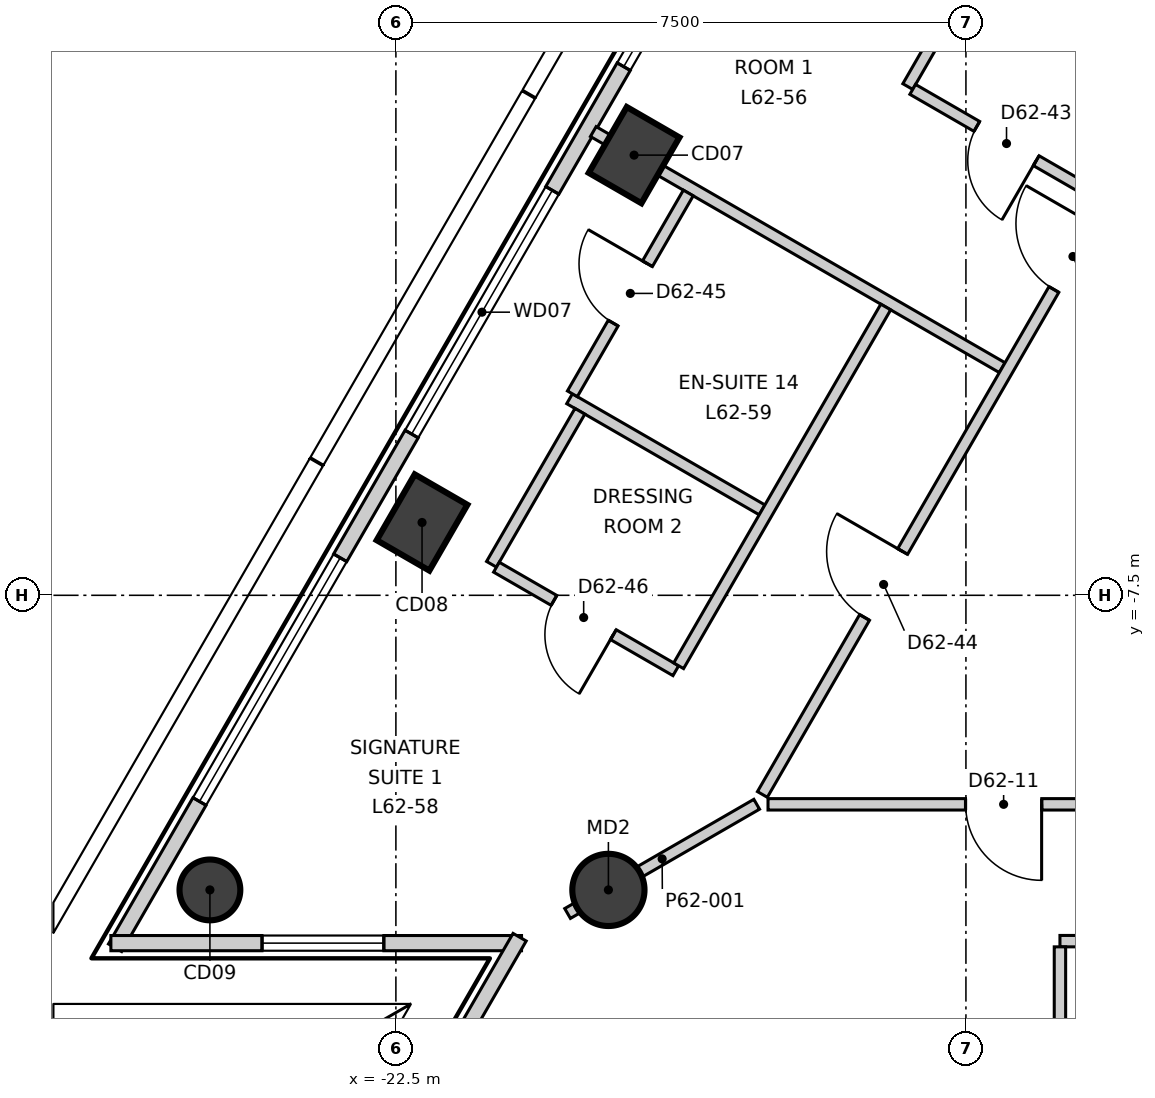
"""IFC4 building model, lengths in metres.
Left out: names, types, materials, properties, quantities, classifications, styles, units other than length and angle.
Written with IfcOpenShell. Run it as: python <this file> out.ifc"""

import sys

from ifc_helpers import new_model, si_unit, direction, frame, frame_2d, origin, origin_2d, place, context, subcontext, project, spatial, rectangle, circle, extrude, element, fill, save


model = new_model("IFC4")
c1 = context("Model", 3, precision=1e-05, world=origin(), true_north=direction((0.0, 1.0)))
c2 = subcontext(c1, "Body", "Model", "MODEL_VIEW")
j1 = project(units=[si_unit("LENGTHUNIT", "METRE"), si_unit("PLANEANGLEUNIT", "RADIAN")], contexts=[c1])
p1 = place(None, origin())
s1 = spatial("IfcSite", under=j1, at=p1, CompositionType="ELEMENT")
p2 = place(p1, origin())
s2 = spatial("IfcBuilding", under=s1, at=p2, CompositionType="ELEMENT")
p3 = place(p2, frame((0.0, 0.0, 268.3)))
s3 = spatial("IfcBuildingStorey", under=s2, at=p3, CompositionType="ELEMENT", Elevation=268.3)
for number, where, z_axis, x_axis in (
    (1, (-19.366, -1.709, -0.3), (0.0, 0.0, 1.0), (0.5, 0.866, 0.0)),
    (2, (-22.156, -6.542, -0.3), (0.0, 0.0, 1.0), (0.5, 0.866, 0.0)),
):
    element("IfcColumn", number, at=place(p3, frame(where, z_axis=z_axis, x_axis=x_axis)), inside=s3, PredefinedType="COLUMN", context=c2, shape_type="SweptSolid", body=[
        extrude(rectangle(XDim=1.0, YDim=0.8, at=origin_2d()), origin(), (0.0, 0.0, 1.0), 3.6),
    ])
p4 = place(p3, frame((-24.947, -11.376, -0.3), z_axis=(0.0, 0.0, 1.0), x_axis=(0.5, 0.866025403784, 0.0)))
e3 = element("IfcColumn", 3, at=p4, inside=s3, PredefinedType="COLUMN", context=c2, shape_type="SweptSolid", body=[
    extrude(circle(Radius=0.4, at=origin_2d()), origin(), (0.0, 0.0, 1.0), 3.6),
])
p5 = place(p3, frame((-19.704, -11.376, -0.3), z_axis=(0.0, 0.0, 1.0), x_axis=(1.0, 0.0, 0.0)))
e4 = element("IfcColumn", 4, at=p5, inside=s3, PredefinedType="COLUMN", context=c2, shape_type="SweptSolid", body=[
    extrude(circle(Radius=0.475, at=origin_2d()), origin(), (0.0, 0.0, 1.0), 3.6),
])
p6 = place(p3, frame((-2.577, 28.771, 0.0), z_axis=(0.0, 0.0, 1.0), x_axis=(-0.49999909388, -0.866025926932, 0.0)))
e5 = element("IfcWall", 5, at=p6, inside=s3, PredefinedType="ELEMENTEDWALL", context=c2, shape_type="SweptSolid", body=[
    extrude(rectangle(XDim=47.236, YDim=0.2, at=frame_2d((23.618, 0.0))), origin(), (0.0, 0.0, 1.0), 3.3),
])
p7 = place(p6, frame((2.243, 0.0, 0.9)))
e6 = element("IfcOpeningElement", 6, at=p7, cuts=e5, PredefinedType="OPENING", context=c2, shape_type="SweptSolid", body=[
    extrude(rectangle(XDim=3.7, YDim=2.2, at=frame_2d((1.85, 1.1))), frame((0.0, 0.11, 0.0), z_axis=(0.0, -1.0, 0.0), x_axis=(1.0, 0.0, 0.0)), (0.0, 0.0, 1.0), 0.22),
])
p8 = place(p6, frame((7.824, 0.0, 0.9)))
e7 = element("IfcOpeningElement", 7, at=p8, cuts=e5, PredefinedType="OPENING", context=c2, shape_type="SweptSolid", body=[
    extrude(rectangle(XDim=3.7, YDim=2.2, at=frame_2d((1.85, 1.1))), frame((0.0, 0.11, 0.0), z_axis=(0.0, -1.0, 0.0), x_axis=(1.0, 0.0, 0.0)), (0.0, 0.0, 1.0), 0.22),
])
p9 = place(p6, frame((13.406, 0.0, 0.9)))
e8 = element("IfcOpeningElement", 8, at=p9, cuts=e5, PredefinedType="OPENING", context=c2, shape_type="SweptSolid", body=[
    extrude(rectangle(XDim=3.7, YDim=2.2, at=frame_2d((1.85, 1.1))), frame((0.0, 0.11, 0.0), z_axis=(0.0, -1.0, 0.0), x_axis=(1.0, 0.0, 0.0)), (0.0, 0.0, 1.0), 0.22),
])
p10 = place(p6, frame((18.987, 0.0, 0.9)))
e9 = element("IfcOpeningElement", 9, at=p10, cuts=e5, PredefinedType="OPENING", context=c2, shape_type="SweptSolid", body=[
    extrude(rectangle(XDim=3.7, YDim=2.2, at=frame_2d((1.85, 1.1))), frame((0.0, 0.11, 0.0), z_axis=(0.0, -1.0, 0.0), x_axis=(1.0, 0.0, 0.0)), (0.0, 0.0, 1.0), 0.22),
])
p11 = place(p6, frame((24.569, 0.0, 0.9)))
e10 = element("IfcOpeningElement", 10, at=p11, cuts=e5, PredefinedType="OPENING", context=c2, shape_type="SweptSolid", body=[
    extrude(rectangle(XDim=3.7, YDim=2.2, at=frame_2d((1.85, 1.1))), frame((0.0, 0.11, 0.0), z_axis=(0.0, -1.0, 0.0), x_axis=(1.0, 0.0, 0.0)), (0.0, 0.0, 1.0), 0.22),
])
p12 = place(p6, frame((30.15, 0.0, 0.9)))
e11 = element("IfcOpeningElement", 11, at=p12, cuts=e5, PredefinedType="OPENING", context=c2, shape_type="SweptSolid", body=[
    extrude(rectangle(XDim=3.7, YDim=2.2, at=frame_2d((1.85, 1.1))), frame((0.0, 0.11, 0.0), z_axis=(0.0, -1.0, 0.0), x_axis=(1.0, 0.0, 0.0)), (0.0, 0.0, 1.0), 0.22),
])
p13 = place(p6, frame((35.731, 0.0, 0.9)))
e12 = element("IfcOpeningElement", 12, at=p13, cuts=e5, PredefinedType="OPENING", context=c2, shape_type="SweptSolid", body=[
    extrude(rectangle(XDim=3.7, YDim=2.2, at=frame_2d((1.85, 1.1))), frame((0.0, 0.11, 0.0), z_axis=(0.0, -1.0, 0.0), x_axis=(1.0, 0.0, 0.0)), (0.0, 0.0, 1.0), 0.22),
])
p14 = place(p6, frame((41.313, 0.0, 0.9)))
e13 = element("IfcOpeningElement", 13, at=p14, cuts=e5, PredefinedType="OPENING", context=c2, shape_type="SweptSolid", body=[
    extrude(rectangle(XDim=3.7, YDim=2.2, at=frame_2d((1.85, 1.1))), frame((0.0, 0.11, 0.0), z_axis=(0.0, -1.0, 0.0), x_axis=(1.0, 0.0, 0.0)), (0.0, 0.0, 1.0), 0.22),
])
p15 = place(p3, frame((-26.25, -12.076, 0.0), z_axis=(0.0, 0.0, 1.0), x_axis=(1.0, 0.0, 0.0)))
e14 = element("IfcWall", 14, at=p15, inside=s3, PredefinedType="ELEMENTEDWALL", context=c2, shape_type="SweptSolid", body=[
    extrude(rectangle(XDim=5.403, YDim=0.2, at=frame_2d((2.702, 0.0))), origin(), (0.0, 0.0, 1.0), 3.3),
])
p16 = place(p15, frame((1.99, 0.0, 0.9)))
e15 = element("IfcOpeningElement", 15, at=p16, cuts=e14, PredefinedType="OPENING", context=c2, shape_type="SweptSolid", body=[
    extrude(rectangle(XDim=1.6, YDim=2.2, at=frame_2d((0.8, 1.1))), frame((0.0, 0.11, 0.0), z_axis=(0.0, -1.0, 0.0), x_axis=(1.0, 0.0, 0.0)), (0.0, 0.0, 1.0), 0.22),
])
p17 = place(p3, frame((-20.872, -11.998, 0.0), z_axis=(0.0, 0.0, 1.0), x_axis=(-0.499992297805, -0.866029850603, 0.0)))
e16 = element("IfcWall", 16, at=p17, inside=s3, PredefinedType="ELEMENTEDWALL", context=c2, shape_type="SweptSolid", body=[
    extrude(rectangle(XDim=5.404, YDim=0.2, at=frame_2d((2.702, 0.0))), origin(), (0.0, 0.0, 1.0), 3.3),
])
p18 = place(p17, frame((1.39, 0.0, 0.9)))
e17 = element("IfcOpeningElement", 17, at=p18, cuts=e16, PredefinedType="OPENING", context=c2, shape_type="SweptSolid", body=[
    extrude(rectangle(XDim=1.6, YDim=2.2, at=frame_2d((0.8, 1.1))), frame((0.0, 0.11, 0.0), z_axis=(0.0, -1.0, 0.0), x_axis=(1.0, 0.0, 0.0)), (0.0, 0.0, 1.0), 0.22),
])
p19 = place(p3, frame((-20.241, -11.686, 0.0), z_axis=(0.0, 0.0, 1.0), x_axis=(0.86594358484, 0.5001416878, 0.0)))
e18 = element("IfcWall", 18, at=p19, inside=s3, PredefinedType="PARTITIONING", context=c2, shape_type="SweptSolid", body=[
    extrude(rectangle(XDim=2.873, YDim=0.15, at=frame_2d((1.437, 0.0))), origin(), (0.0, 0.0, 1.0), 2.8),
])
p20 = place(p3, frame((-19.903, -1.399, 0.0), z_axis=(0.0, 0.0, 1.0), x_axis=(0.866043575568, -0.499968524226, 0.0)))
e19 = element("IfcWall", 19, at=p20, inside=s3, PredefinedType="PARTITIONING", context=c2, shape_type="SweptSolid", body=[
    extrude(rectangle(XDim=6.212, YDim=0.15, at=frame_2d((3.106, 0.0))), origin(), (0.0, 0.0, 1.0), 3.3),
])
p21 = place(p3, frame((-17.678, -10.12, 0.0), z_axis=(0.0, 0.0, 1.0), x_axis=(0.49998824015, 0.86603219323, 0.0)))
e20 = element("IfcWall", 20, at=p21, inside=s3, PredefinedType="PARTITIONING", context=c2, shape_type="SweptSolid", body=[
    extrude(rectangle(XDim=35.357, YDim=0.15, at=frame_2d((17.678, 0.0))), origin(), (0.0, 0.0, 1.0), 3.3),
])
p22 = place(p21, frame((31.607, 0.0, 0.0)))
e21 = element("IfcOpeningElement", 21, at=p22, cuts=e20, PredefinedType="OPENING", context=c2, shape_type="SweptSolid", body=[
    extrude(rectangle(XDim=1.0, YDim=2.1, at=frame_2d((0.5, 1.05))), frame((0.0, 0.085, 0.0), z_axis=(0.0, -1.0, 0.0), x_axis=(1.0, 0.0, 0.0)), (0.0, 0.0, 1.0), 0.17),
])
p23 = place(p21, frame((19.416, 0.0, 0.0)))
e22 = element("IfcOpeningElement", 22, at=p23, cuts=e20, PredefinedType="OPENING", context=c2, shape_type="SweptSolid", body=[
    extrude(rectangle(XDim=1.0, YDim=2.1, at=frame_2d((0.5, 1.05))), frame((0.0, 0.085, 0.0), z_axis=(0.0, -1.0, 0.0), x_axis=(1.0, 0.0, 0.0)), (0.0, 0.0, 1.0), 0.17),
])
p24 = place(p21, frame((24.916, 0.0, 0.0)))
e23 = element("IfcOpeningElement", 23, at=p24, cuts=e20, PredefinedType="OPENING", context=c2, shape_type="SweptSolid", body=[
    extrude(rectangle(XDim=0.9, YDim=2.1, at=frame_2d((0.45, 1.05))), frame((0.0, 0.085, 0.0), z_axis=(0.0, -1.0, 0.0), x_axis=(1.0, 0.0, 0.0)), (0.0, 0.0, 1.0), 0.17),
])
p25 = place(p21, frame((22.816, 0.0, 0.0)))
e24 = element("IfcOpeningElement", 24, at=p25, cuts=e20, PredefinedType="OPENING", context=c2, shape_type="SweptSolid", body=[
    extrude(rectangle(XDim=0.9, YDim=2.1, at=frame_2d((0.45, 1.05))), frame((0.0, 0.085, 0.0), z_axis=(0.0, -1.0, 0.0), x_axis=(1.0, 0.0, 0.0)), (0.0, 0.0, 1.0), 0.17),
])
p26 = place(p21, frame((14.654, 0.0, 0.0)))
e25 = element("IfcOpeningElement", 25, at=p26, cuts=e20, PredefinedType="OPENING", context=c2, shape_type="SweptSolid", body=[
    extrude(rectangle(XDim=1.0, YDim=2.1, at=frame_2d((0.5, 1.05))), frame((0.0, 0.085, 0.0), z_axis=(0.0, -1.0, 0.0), x_axis=(1.0, 0.0, 0.0)), (0.0, 0.0, 1.0), 0.17),
])
p27 = place(p21, frame((7.672, 0.0, 0.0)))
e26 = element("IfcOpeningElement", 26, at=p27, cuts=e20, PredefinedType="OPENING", context=c2, shape_type="SweptSolid", body=[
    extrude(rectangle(XDim=1.0, YDim=2.1, at=frame_2d((0.5, 1.05))), frame((0.0, 0.085, 0.0), z_axis=(0.0, -1.0, 0.0), x_axis=(1.0, 0.0, 0.0)), (0.0, 0.0, 1.0), 0.17),
])
p28 = place(p21, frame((2.69, 0.0, 0.0)))
e27 = element("IfcOpeningElement", 27, at=p28, cuts=e20, PredefinedType="OPENING", context=c2, shape_type="SweptSolid", body=[
    extrude(rectangle(XDim=1.0, YDim=2.1, at=frame_2d((0.5, 1.05))), frame((0.0, 0.085, 0.0), z_axis=(0.0, -1.0, 0.0), x_axis=(1.0, 0.0, 0.0)), (0.0, 0.0, 1.0), 0.17),
])
p29 = place(p3, frame((-17.604, -10.25, 0.0), z_axis=(0.0, 0.0, 1.0), x_axis=(1.0, 0.0, 0.0)))
e28 = element("IfcWall", 28, at=p29, inside=s3, PredefinedType="PARTITIONING", context=c2, shape_type="SweptSolid", body=[
    extrude(rectangle(XDim=35.358, YDim=0.15, at=frame_2d((17.679, 0.0))), origin(), (0.0, 0.0, 1.0), 3.3),
])
p30 = place(p29, frame((2.6, 0.0, 0.0)))
e29 = element("IfcOpeningElement", 29, at=p30, cuts=e28, PredefinedType="OPENING", context=c2, shape_type="SweptSolid", body=[
    extrude(rectangle(XDim=1.0, YDim=2.1, at=frame_2d((0.5, 1.05))), frame((0.0, 0.085, 0.0), z_axis=(0.0, -1.0, 0.0), x_axis=(1.0, 0.0, 0.0)), (0.0, 0.0, 1.0), 0.17),
])
p31 = place(p29, frame((8.391, 0.0, 0.0)))
e30 = element("IfcOpeningElement", 30, at=p31, cuts=e28, PredefinedType="OPENING", context=c2, shape_type="SweptSolid", body=[
    extrude(rectangle(XDim=1.0, YDim=2.1, at=frame_2d((0.5, 1.05))), frame((0.0, 0.085, 0.0), z_axis=(0.0, -1.0, 0.0), x_axis=(1.0, 0.0, 0.0)), (0.0, 0.0, 1.0), 0.17),
])
p32 = place(p29, frame((20.473, 0.0, 0.0)))
e31 = element("IfcOpeningElement", 31, at=p32, cuts=e28, PredefinedType="OPENING", context=c2, shape_type="SweptSolid", body=[
    extrude(rectangle(XDim=1.0, YDim=2.1, at=frame_2d((0.5, 1.05))), frame((0.0, 0.085, 0.0), z_axis=(0.0, -1.0, 0.0), x_axis=(1.0, 0.0, 0.0)), (0.0, 0.0, 1.0), 0.17),
])
p33 = place(p29, frame((14.973, 0.0, 0.0)))
e32 = element("IfcOpeningElement", 32, at=p33, cuts=e28, PredefinedType="OPENING", context=c2, shape_type="SweptSolid", body=[
    extrude(rectangle(XDim=0.9, YDim=2.1, at=frame_2d((0.45, 1.05))), frame((0.0, 0.085, 0.0), z_axis=(0.0, -1.0, 0.0), x_axis=(1.0, 0.0, 0.0)), (0.0, 0.0, 1.0), 0.17),
])
p34 = place(p29, frame((17.173, 0.0, 0.0)))
e33 = element("IfcOpeningElement", 33, at=p34, cuts=e28, PredefinedType="OPENING", context=c2, shape_type="SweptSolid", body=[
    extrude(rectangle(XDim=0.9, YDim=2.1, at=frame_2d((0.45, 1.05))), frame((0.0, 0.085, 0.0), z_axis=(0.0, -1.0, 0.0), x_axis=(1.0, 0.0, 0.0)), (0.0, 0.0, 1.0), 0.17),
])
p35 = place(p29, frame((28.735, 0.0, 0.0)))
e34 = element("IfcOpeningElement", 34, at=p35, cuts=e28, PredefinedType="OPENING", context=c2, shape_type="SweptSolid", body=[
    extrude(rectangle(XDim=1.0, YDim=2.1, at=frame_2d((0.5, 1.05))), frame((0.0, 0.085, 0.0), z_axis=(0.0, -1.0, 0.0), x_axis=(1.0, 0.0, 0.0)), (0.0, 0.0, 1.0), 0.17),
])
p36 = place(p3, frame((-20.215, -4.914, 0.0), z_axis=(0.0, 0.0, 1.0), x_axis=(0.866118873815, -0.499838070201, 0.0)))
e35 = element("IfcWall", 35, at=p36, inside=s3, PredefinedType="PARTITIONING", context=c2, shape_type="SweptSolid", body=[
    extrude(rectangle(XDim=2.925, YDim=0.15, at=frame_2d((1.462, 0.0))), origin(), (0.0, 0.0, 1.0), 3.3),
])
p37 = place(p3, frame((-21.242, -7.092, 0.0), z_axis=(0.0, 0.0, 1.0), x_axis=(0.500216356891, 0.865900454035, 0.0)))
e36 = element("IfcWall", 36, at=p37, inside=s3, PredefinedType="PARTITIONING", context=c2, shape_type="SweptSolid", body=[
    extrude(rectangle(XDim=2.325, YDim=0.15, at=frame_2d((1.162, 0.0))), origin(), (0.0, 0.0, 1.0), 3.3),
])
p38 = place(p3, frame((-21.177, -7.13, 0.0), z_axis=(0.0, 0.0, 1.0), x_axis=(0.866112488944, -0.499849133735, 0.0)))
e37 = element("IfcWall", 37, at=p38, inside=s3, PredefinedType="PARTITIONING", context=c2, shape_type="SweptSolid", body=[
    extrude(rectangle(XDim=2.725, YDim=0.15, at=frame_2d((1.362, 0.0))), origin(), (0.0, 0.0, 1.0), 3.3),
])
p39 = place(p38, frame((0.875, 0.0, 0.0)))
e38 = element("IfcOpeningElement", 38, at=p39, cuts=e37, PredefinedType="OPENING", context=c2, shape_type="SweptSolid", body=[
    extrude(rectangle(XDim=0.9, YDim=2.1, at=frame_2d((0.45, 1.05))), frame((0.0, 0.085, 0.0), z_axis=(0.0, -1.0, 0.0), x_axis=(1.0, 0.0, 0.0)), (0.0, 0.0, 1.0), 0.17),
])
p40 = place(p3, frame((-18.78, -8.427, 0.0), z_axis=(0.0, 0.0, 1.0), x_axis=(0.500002931134, 0.866023711487, 0.0)))
e39 = element("IfcWall", 39, at=p40, inside=s3, PredefinedType="PARTITIONING", context=c2, shape_type="SweptSolid", body=[
    extrude(rectangle(XDim=5.45, YDim=0.15, at=frame_2d((2.725, 0.0))), origin(), (0.0, 0.0, 1.0), 3.3),
])
p41 = place(p3, frame((-20.178, -4.849, 0.0), z_axis=(0.0, 0.0, 1.0), x_axis=(0.499874869213, 0.866097636026, 0.0)))
e40 = element("IfcWall", 40, at=p41, inside=s3, PredefinedType="PARTITIONING", context=c2, shape_type="SweptSolid", body=[
    extrude(rectangle(XDim=3.051, YDim=0.15, at=frame_2d((1.525, 0.0))), origin(), (0.0, 0.0, 1.0), 3.3),
])
p42 = place(p41, frame((1.075, 0.0, 0.0)))
e41 = element("IfcOpeningElement", 41, at=p42, cuts=e40, PredefinedType="OPENING", context=c2, shape_type="SweptSolid", body=[
    extrude(rectangle(XDim=0.9, YDim=2.1, at=frame_2d((0.45, 1.05))), frame((0.0, 0.085, 0.0), z_axis=(0.0, -1.0, 0.0), x_axis=(1.0, 0.0, 0.0)), (0.0, 0.0, 1.0), 0.17),
])
p43 = place(p3, frame((-15.765, -0.807, 0.0), z_axis=(0.0, 0.0, 1.0), x_axis=(0.499729678228, 0.86618141789, 0.0)))
e42 = element("IfcWall", 42, at=p43, inside=s3, PredefinedType="PARTITIONING", context=c2, shape_type="SweptSolid", body=[
    extrude(rectangle(XDim=2.925, YDim=0.15, at=frame_2d((1.463, 0.0))), origin(), (0.0, 0.0, 1.0), 3.3),
])
p44 = place(p3, frame((-15.7, -0.844, 0.0), z_axis=(0.0, 0.0, 1.0), x_axis=(0.866004402611, -0.500036373335, 0.0)))
e43 = element("IfcWall", 43, at=p44, inside=s3, PredefinedType="PARTITIONING", context=c2, shape_type="SweptSolid", body=[
    extrude(rectangle(XDim=2.85, YDim=0.15, at=frame_2d((1.425, 0.0))), origin(), (0.0, 0.0, 1.0), 3.3),
])
p45 = place(p44, frame((0.975, 0.0, 0.0)))
e44 = element("IfcOpeningElement", 44, at=p45, cuts=e43, PredefinedType="OPENING", context=c2, shape_type="SweptSolid", body=[
    extrude(rectangle(XDim=0.9, YDim=2.1, at=frame_2d((0.45, 1.05))), frame((0.0, 0.085, 0.0), z_axis=(0.0, -1.0, 0.0), x_axis=(1.0, 0.0, 0.0)), (0.0, 0.0, 1.0), 0.17),
])
p46 = place(p3, frame((-13.763, -12.05, 0.0), z_axis=(0.0, 0.0, 1.0), x_axis=(1.0, 0.0, 0.0)))
e45 = element("IfcWall", 45, at=p46, inside=s3, PredefinedType="PARTITIONING", context=c2, shape_type="SweptSolid", body=[
    extrude(rectangle(XDim=2.525, YDim=0.15, at=frame_2d((1.262, 0.0))), origin(), (0.0, 0.0, 1.0), 3.3),
])
p47 = place(p3, frame((-13.763, -15.05, 0.0), z_axis=(0.0, 0.0, 1.0), x_axis=(0.0, 1.0, 0.0)))
e46 = element("IfcWall", 46, at=p47, inside=s3, PredefinedType="PARTITIONING", context=c2, shape_type="SweptSolid", body=[
    extrude(rectangle(XDim=2.925, YDim=0.15, at=frame_2d((1.462, 0.0))), origin(), (0.0, 0.0, 1.0), 3.3),
])
p48 = place(p47, frame((1.05, 0.0, 0.0)))
e47 = element("IfcOpeningElement", 47, at=p48, cuts=e46, PredefinedType="OPENING", context=c2, shape_type="SweptSolid", body=[
    extrude(rectangle(XDim=0.9, YDim=2.1, at=frame_2d((0.45, 1.05))), frame((0.0, 0.085, 0.0), z_axis=(0.0, -1.0, 0.0), x_axis=(1.0, 0.0, 0.0)), (0.0, 0.0, 1.0), 0.17),
])
p49 = place(p12, origin())
e48 = element("IfcWindow", 48, at=p49, inside=s3, PartitioningType="SINGLE_PANEL", PredefinedType="WINDOW", context=c2, shape_type="SweptSolid", body=[
    extrude(rectangle(XDim=3.7, YDim=2.2, at=frame_2d((1.85, 1.1))), frame((0.0, 0.03, 0.0), z_axis=(0.0, -1.0, 0.0), x_axis=(1.0, 0.0, 0.0)), (0.0, 0.0, 1.0), 0.06),
])
fill(e11, e48)
p50 = place(p13, origin())
e49 = element("IfcWindow", 49, at=p50, inside=s3, PartitioningType="SINGLE_PANEL", PredefinedType="WINDOW", context=c2, shape_type="SweptSolid", body=[
    extrude(rectangle(XDim=3.7, YDim=2.2, at=frame_2d((1.85, 1.1))), frame((0.0, 0.03, 0.0), z_axis=(0.0, -1.0, 0.0), x_axis=(1.0, 0.0, 0.0)), (0.0, 0.0, 1.0), 0.06),
])
fill(e12, e49)
p51 = place(p14, origin())
e50 = element("IfcWindow", 50, at=p51, inside=s3, PartitioningType="SINGLE_PANEL", PredefinedType="WINDOW", context=c2, shape_type="SweptSolid", body=[
    extrude(rectangle(XDim=3.7, YDim=2.2, at=frame_2d((1.85, 1.1))), frame((0.0, 0.03, 0.0), z_axis=(0.0, -1.0, 0.0), x_axis=(1.0, 0.0, 0.0)), (0.0, 0.0, 1.0), 0.06),
])
fill(e13, e50)
p52 = place(p16, origin())
e51 = element("IfcWindow", 51, at=p52, inside=s3, PartitioningType="SINGLE_PANEL", PredefinedType="WINDOW", context=c2, shape_type="SweptSolid", body=[
    extrude(rectangle(XDim=1.6, YDim=2.2, at=frame_2d((0.8, 1.1))), frame((0.0, 0.03, 0.0), z_axis=(0.0, -1.0, 0.0), x_axis=(1.0, 0.0, 0.0)), (0.0, 0.0, 1.0), 0.06),
])
fill(e15, e51)
p53 = place(p30, origin())
e52 = element("IfcDoor", 52, at=p53, inside=s3, OperationType="SINGLE_SWING_RIGHT", PredefinedType="DOOR", context=c2, shape_type="SweptSolid", body=[
    extrude(rectangle(XDim=1.0, YDim=2.1, at=frame_2d((0.5, 1.05))), frame((0.0, 0.025, 0.0), z_axis=(0.0, -1.0, 0.0), x_axis=(1.0, 0.0, 0.0)), (0.0, 0.0, 1.0), 0.05),
])
fill(e29, e52)
p54 = place(p27, origin())
e53 = element("IfcDoor", 53, at=p54, inside=s3, OperationType="SINGLE_SWING_LEFT", PredefinedType="DOOR", context=c2, shape_type="SweptSolid", body=[
    extrude(rectangle(XDim=1.0, YDim=2.1, at=frame_2d((0.5, 1.05))), frame((0.0, 0.025, 0.0), z_axis=(0.0, -1.0, 0.0), x_axis=(1.0, 0.0, 0.0)), (0.0, 0.0, 1.0), 0.05),
])
fill(e26, e53)
p55 = place(p45, origin())
e54 = element("IfcDoor", 54, at=p55, inside=s3, OperationType="SINGLE_SWING_RIGHT", PredefinedType="DOOR", context=c2, shape_type="SweptSolid", body=[
    extrude(rectangle(XDim=0.9, YDim=2.1, at=frame_2d((0.45, 1.05))), frame((0.0, 0.025, 0.0), z_axis=(0.0, -1.0, 0.0), x_axis=(1.0, 0.0, 0.0)), (0.0, 0.0, 1.0), 0.05),
])
fill(e44, e54)
p56 = place(p28, origin())
e55 = element("IfcDoor", 55, at=p56, inside=s3, OperationType="SINGLE_SWING_LEFT", PredefinedType="DOOR", context=c2, shape_type="SweptSolid", body=[
    extrude(rectangle(XDim=1.0, YDim=2.1, at=frame_2d((0.5, 1.05))), frame((0.0, 0.025, 0.0), z_axis=(0.0, -1.0, 0.0), x_axis=(1.0, 0.0, 0.0)), (0.0, 0.0, 1.0), 0.05),
])
fill(e27, e55)
p57 = place(p42, origin())
e56 = element("IfcDoor", 56, at=p57, inside=s3, OperationType="SINGLE_SWING_LEFT", PredefinedType="DOOR", context=c2, shape_type="SweptSolid", body=[
    extrude(rectangle(XDim=0.9, YDim=2.1, at=frame_2d((0.45, 1.05))), frame((0.0, 0.025, 0.0), z_axis=(0.0, -1.0, 0.0), x_axis=(1.0, 0.0, 0.0)), (0.0, 0.0, 1.0), 0.05),
])
fill(e41, e56)
p58 = place(p39, origin())
e57 = element("IfcDoor", 57, at=p58, inside=s3, OperationType="SINGLE_SWING_RIGHT", PredefinedType="DOOR", context=c2, shape_type="SweptSolid", body=[
    extrude(rectangle(XDim=0.9, YDim=2.1, at=frame_2d((0.45, 1.05))), frame((0.0, 0.025, 0.0), z_axis=(0.0, -1.0, 0.0), x_axis=(1.0, 0.0, 0.0)), (0.0, 0.0, 1.0), 0.05),
])
fill(e38, e57)
save(model, sys.argv[1])
